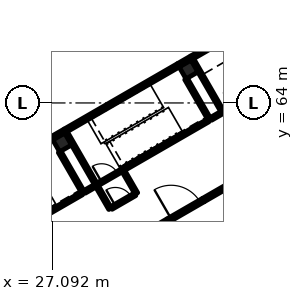
"""IFC4 building model, lengths in metres.
Left out: names, types, materials, properties, quantities, classifications, styles, units other than length and angle.
Written with IfcOpenShell. Run it as: python <this file> out.ifc"""

import sys

from ifc_helpers import new_model, si_unit, direction, frame, frame_2d, origin, origin_2d, place, context, subcontext, project, spatial, rectangle, extrude, element, fill, save


model = new_model("IFC4")
c1 = context("Model", 3, precision=1e-05, world=origin(), true_north=direction((0.0, 1.0)))
c2 = subcontext(c1, "Body", "Model", "MODEL_VIEW")
j1 = project(units=[si_unit("LENGTHUNIT", "METRE"), si_unit("PLANEANGLEUNIT", "RADIAN")], contexts=[c1])
p1 = place(None, origin())
s1 = spatial("IfcSite", under=j1, at=p1, CompositionType="ELEMENT")
p2 = place(p1, origin())
s2 = spatial("IfcBuilding", under=s1, at=p2, CompositionType="ELEMENT")
p3 = place(p2, frame((0.0, 0.0, 6.0)))
s3 = spatial("IfcBuildingStorey", under=s2, at=p3, CompositionType="ELEMENT", Elevation=6.0)
for number, where, z_axis, x_axis in (
    (1, (27.746, 61.399, 0.0), (0.0, 0.0, 1.0), (-0.5, 0.866, 0.0)),
    (2, (36.06, 66.199, 0.0), (0.0, 0.0, 1.0), (-0.5, 0.866, 0.0)),
):
    element("IfcColumn", number, at=place(p3, frame(where, z_axis=z_axis, x_axis=x_axis)), inside=s3, PredefinedType="COLUMN", context=c2, shape_type="SweptSolid", body=[
        extrude(rectangle(XDim=0.9, YDim=0.9, at=origin_2d()), origin(), (0.0, 0.0, 1.0), 5.4),
    ])
p4 = place(p3, frame((19.621, 57.372, 0.0), z_axis=(0.0, 0.0, 1.0), x_axis=(0.866021068297, 0.500007509209, 0.0)))
e3 = element("IfcWall", 3, at=p4, inside=s3, PredefinedType="SOLIDWALL", context=c2, shape_type="SweptSolid", body=[
    extrude(rectangle(XDim=8.6, YDim=0.25, at=frame_2d((4.3, 0.0))), origin(), (0.0, 0.0, 1.0), 5.1),
])
p5 = place(p3, frame((27.935, 62.172, 0.0), z_axis=(0.0, 0.0, 1.0), x_axis=(0.86604045752, 0.499973925258, 0.0)))
e4 = element("IfcWall", 4, at=p5, inside=s3, PredefinedType="SOLIDWALL", context=c2, shape_type="SweptSolid", body=[
    extrude(rectangle(XDim=8.6, YDim=0.25, at=frame_2d((4.3, 0.0))), origin(), (0.0, 0.0, 1.0), 5.1),
])
p6 = place(p3, frame((36.249, 66.972, 0.0), z_axis=(0.0, 0.0, 1.0), x_axis=(0.866013253925, 0.500021043584, 0.0)))
e5 = element("IfcWall", 5, at=p6, inside=s3, PredefinedType="SOLIDWALL", context=c2, shape_type="SweptSolid", body=[
    extrude(rectangle(XDim=8.8, YDim=0.25, at=frame_2d((4.4, 0.0))), origin(), (0.0, 0.0, 1.0), 5.1),
])
for number, where, z_axis, x_axis in (
    (6, (27.069, 61.672, 0.0), (0.0, 0.0, 1.0), (0.866, 0.5, 0.0)),
    (7, (35.383, 66.472, 0.0), (0.0, 0.0, 1.0), (0.866, 0.5, 0.0)),
):
    element("IfcWall", number, at=place(p3, frame(where, z_axis=z_axis, x_axis=x_axis)), inside=s3, PredefinedType="SOLIDWALL", context=c2, shape_type="SweptSolid", body=[
        extrude(rectangle(XDim=1.0, YDim=0.25, at=frame_2d((0.5, 0.0))), origin(), (0.0, 0.0, 1.0), 5.1),
    ])
p7 = place(p3, frame((29.131, 58.099, 0.0), z_axis=(0.0, 0.0, 1.0), x_axis=(-0.49999285859, 0.86602952684, 0.0)))
e8 = element("IfcWall", 8, at=p7, inside=s3, PredefinedType="SOLIDWALL", context=c2, shape_type="SweptSolid", body=[
    extrude(rectangle(XDim=3.1, YDim=0.2, at=frame_2d((1.55, 0.0))), origin(), (0.0, 0.0, 1.0), 5.1),
])
p8 = place(p3, frame((29.997, 58.599, 0.0), z_axis=(0.0, 0.0, 1.0), x_axis=(-0.49999894854, 0.866026010844, 0.0)))
e9 = element("IfcWall", 9, at=p8, inside=s3, PredefinedType="SOLIDWALL", context=c2, shape_type="SweptSolid", body=[
    extrude(rectangle(XDim=4.0, YDim=0.2, at=frame_2d((2.0, 0.0))), origin(), (0.0, 0.0, 1.0), 5.1),
])
p9 = place(p3, frame((37.445, 62.899, 0.0), z_axis=(0.0, 0.0, 1.0), x_axis=(-0.500026960575, 0.86600983753, 0.0)))
e10 = element("IfcWall", 10, at=p9, inside=s3, PredefinedType="SOLIDWALL", context=c2, shape_type="SweptSolid", body=[
    extrude(rectangle(XDim=3.1, YDim=0.2, at=frame_2d((1.55, 0.0))), origin(), (0.0, 0.0, 1.0), 5.1),
])
p10 = place(p3, frame((23.285, 54.724, 0.0), z_axis=(0.0, 0.0, 1.0), x_axis=(0.866027239912, 0.49999681972, 0.0)))
e11 = element("IfcWall", 11, at=p10, inside=s3, PredefinedType="SOLIDWALL", context=c2, shape_type="SweptSolid", body=[
    extrude(rectangle(XDim=6.65, YDim=0.2, at=frame_2d((3.325, 0.0))), origin(), (0.0, 0.0, 1.0), 5.1),
])
p11 = place(p3, frame((30.084, 58.649, 0.0), z_axis=(0.0, 0.0, 1.0), x_axis=(0.866036909293, 0.499980071345, 0.0)))
e12 = element("IfcWall", 12, at=p11, inside=s3, PredefinedType="SOLIDWALL", context=c2, shape_type="SweptSolid", body=[
    extrude(rectangle(XDim=1.75, YDim=0.2, at=frame_2d((0.875, 0.0))), origin(), (0.0, 0.0, 1.0), 5.1),
])
p12 = place(p11, frame((0.3, 0.0, 0.0)))
e13 = element("IfcOpeningElement", 13, at=p12, cuts=e12, PredefinedType="OPENING", context=c2, shape_type="SweptSolid", body=[
    extrude(rectangle(XDim=1.2, YDim=2.1, at=frame_2d((0.6, 1.05))), frame((0.0, 0.11, 0.0), z_axis=(0.0, -1.0, 0.0), x_axis=(1.0, 0.0, 0.0)), (0.0, 0.0, 1.0), 0.22),
])
p13 = place(p3, frame((31.599, 59.524, 0.0), z_axis=(0.0, 0.0, 1.0), x_axis=(0.866027239912, 0.49999681972, 0.0)))
e14 = element("IfcWall", 14, at=p13, inside=s3, PredefinedType="SOLIDWALL", context=c2, shape_type="SweptSolid", body=[
    extrude(rectangle(XDim=6.65, YDim=0.2, at=frame_2d((3.325, 0.0))), origin(), (0.0, 0.0, 1.0), 5.1),
])
p14 = place(p3, frame((38.311, 63.399, 0.0), z_axis=(0.0, 0.0, 1.0), x_axis=(-0.49999894854, 0.866026010844, 0.0)))
e15 = element("IfcWall", 15, at=p14, inside=s3, PredefinedType="SOLIDWALL", context=c2, shape_type="SweptSolid", body=[
    extrude(rectangle(XDim=4.0, YDim=0.2, at=frame_2d((2.0, 0.0))), origin(), (0.0, 0.0, 1.0), 5.1),
])
for number, where, z_axis, x_axis in (
    (16, (30.897, 57.041, 0.0), (0.0, 0.0, 1.0), (-0.5, 0.866, 0.0)),
    (17, (32.629, 58.041, 0.0), (0.0, 0.0, 1.0), (-0.5, 0.866, 0.0)),
):
    element("IfcWall", number, at=place(p3, frame(where, z_axis=z_axis, x_axis=x_axis)), inside=s3, PredefinedType="PARTITIONING", context=c2, shape_type="SweptSolid", body=[
        extrude(rectangle(XDim=1.7, YDim=0.2, at=frame_2d((0.85, 0.0))), origin(), (0.0, 0.0, 1.0), 4.5),
    ])
p15 = place(p3, frame((30.984, 57.091, 0.0), z_axis=(0.0, 0.0, 1.0), x_axis=(0.866047807691, 0.499961193289, 0.0)))
e18 = element("IfcWall", 18, at=p15, inside=s3, PredefinedType="PARTITIONING", context=c2, shape_type="SweptSolid", body=[
    extrude(rectangle(XDim=1.8, YDim=0.2, at=frame_2d((0.9, 0.0))), origin(), (0.0, 0.0, 1.0), 4.5),
])
p16 = place(p15, frame((0.3, 0.0, 0.0)))
e19 = element("IfcOpeningElement", 19, at=p16, cuts=e18, PredefinedType="OPENING", context=c2, shape_type="SweptSolid", body=[
    extrude(rectangle(XDim=1.2, YDim=2.1, at=frame_2d((0.6, 1.05))), frame((0.0, 0.11, 0.0), z_axis=(0.0, -1.0, 0.0), x_axis=(1.0, 0.0, 0.0)), (0.0, 0.0, 1.0), 0.22),
])
p17 = place(p3, frame((28.72, 52.811, 0.0), z_axis=(0.0, 0.0, 1.0), x_axis=(0.866028853923, 0.499994024137, 0.0)))
e20 = element("IfcWall", 20, at=p17, inside=s3, PredefinedType="SOLIDWALL", context=c2, shape_type="SweptSolid", body=[
    extrude(rectangle(XDim=6.9, YDim=0.25, at=frame_2d((3.45, 0.0))), origin(), (0.0, 0.0, 1.0), 4.5),
])
p18 = place(p3, frame((34.696, 56.26, 0.0), z_axis=(0.0, 0.0, 1.0), x_axis=(0.866019956843, 0.50000943426, 0.0)))
e21 = element("IfcWall", 21, at=p18, inside=s3, PredefinedType="SOLIDWALL", context=c2, shape_type="SweptSolid", body=[
    extrude(rectangle(XDim=2.7, YDim=0.25, at=frame_2d((1.35, 0.0))), origin(), (0.0, 0.0, 1.0), 4.5),
])
p19 = place(p18, frame((0.25, 0.0, 0.0)))
e22 = element("IfcOpeningElement", 22, at=p19, cuts=e21, PredefinedType="OPENING", context=c2, shape_type="SweptSolid", body=[
    extrude(rectangle(XDim=2.2, YDim=2.1, at=frame_2d((1.1, 1.05))), frame((0.0, 0.135, 0.0), z_axis=(0.0, -1.0, 0.0), x_axis=(1.0, 0.0, 0.0)), (0.0, 0.0, 1.0), 0.27),
])
p20 = place(p3, frame((37.034, 57.611, 0.0), z_axis=(0.0, 0.0, 1.0), x_axis=(0.866015111908, 0.50001782563, 0.0)))
e23 = element("IfcWall", 23, at=p20, inside=s3, PredefinedType="SOLIDWALL", context=c2, shape_type="SweptSolid", body=[
    extrude(rectangle(XDim=5.7, YDim=0.25, at=frame_2d((2.85, 0.0))), origin(), (0.0, 0.0, 1.0), 4.5),
])
p21 = place(p3, frame((29.218, 58.149, 0.0), z_axis=(0.0, 0.0, 1.0), x_axis=(0.866017831539, 0.500013115284, 0.0)))
e24 = element("IfcWall", 24, at=p21, inside=s3, PredefinedType="PARTITIONING", context=c2, shape_type="SweptSolid", body=[
    extrude(rectangle(XDim=0.8, YDim=0.2, at=frame_2d((0.4, 0.0))), origin(), (0.0, 0.0, 1.0), 4.5),
])
p22 = place(p3, frame((37.531, 62.949, 0.0), z_axis=(0.0, 0.0, 1.0), x_axis=(0.866094119867, 0.499880961361, 0.0)))
e25 = element("IfcWall", 25, at=p22, inside=s3, PredefinedType="PARTITIONING", context=c2, shape_type="SweptSolid", body=[
    extrude(rectangle(XDim=0.8, YDim=0.2, at=frame_2d((0.4, 0.0))), origin(), (0.0, 0.0, 1.0), 4.5),
])
p23 = place(p12, origin())
e26 = element("IfcDoor", 26, at=p23, inside=s3, OperationType="SINGLE_SWING_LEFT", PredefinedType="DOOR", context=c2, shape_type="SweptSolid", body=[
    extrude(rectangle(XDim=1.2, YDim=2.1, at=frame_2d((0.6, 1.05))), frame((0.0, 0.025, 0.0), z_axis=(0.0, -1.0, 0.0), x_axis=(1.0, 0.0, 0.0)), (0.0, 0.0, 1.0), 0.05),
])
fill(e13, e26)
p24 = place(p16, origin())
e27 = element("IfcDoor", 27, at=p24, inside=s3, OperationType="SINGLE_SWING_LEFT", PredefinedType="DOOR", context=c2, shape_type="SweptSolid", body=[
    extrude(rectangle(XDim=1.2, YDim=2.1, at=frame_2d((0.6, 1.05))), frame((0.0, 0.025, 0.0), z_axis=(0.0, -1.0, 0.0), x_axis=(1.0, 0.0, 0.0)), (0.0, 0.0, 1.0), 0.05),
])
fill(e19, e27)
p25 = place(p19, origin())
e28 = element("IfcDoor", 28, at=p25, inside=s3, OperationType="DOUBLE_DOOR_SINGLE_SWING", PredefinedType="DOOR", context=c2, shape_type="SweptSolid", body=[
    extrude(rectangle(XDim=2.2, YDim=2.1, at=frame_2d((1.1, 1.05))), frame((0.0, 0.025, 0.0), z_axis=(0.0, -1.0, 0.0), x_axis=(1.0, 0.0, 0.0)), (0.0, 0.0, 1.0), 0.05),
])
fill(e22, e28)
save(model, sys.argv[1])
